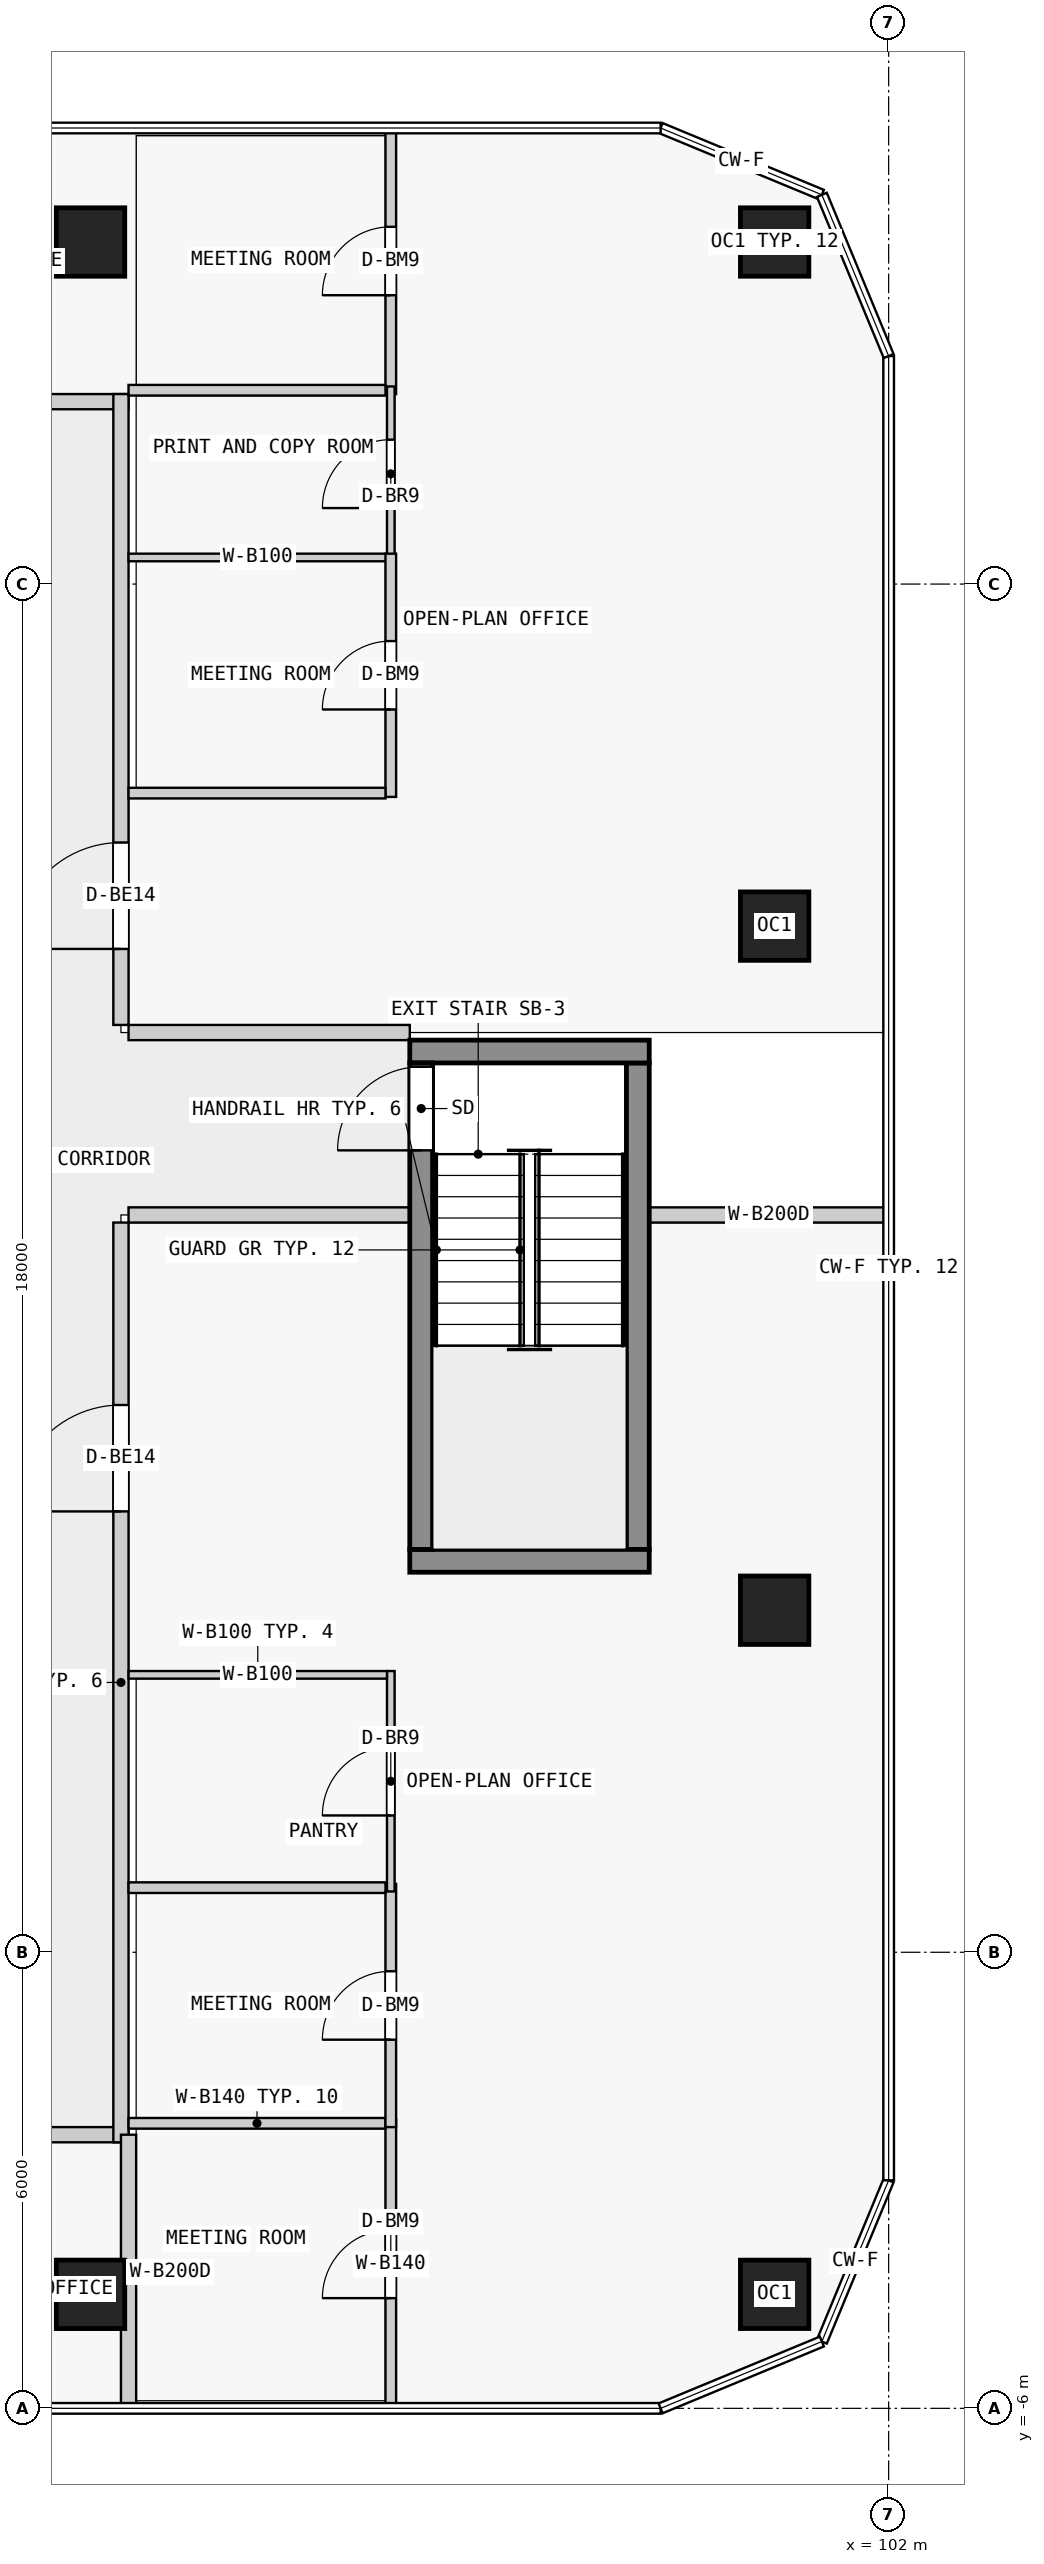
"""IFC4 building model, lengths in metres.
Left out: names, types, materials, properties, quantities, classifications, styles, units other than length and angle.
Written with IfcOpenShell. Run it as: python <this file> out.ifc"""

import sys

from ifc_helpers import new_model, si_unit, direction, frame, frame_2d, origin, origin_2d, place, context, subcontext, project, spatial, rectangle, extrude, element, fill, save


model = new_model("IFC4")
c1 = context("Model", 3, precision=1e-05, world=origin(), true_north=direction((0.0, 1.0)))
c2 = subcontext(c1, "Body", "Model", "MODEL_VIEW")
j1 = project(units=[si_unit("LENGTHUNIT", "METRE"), si_unit("PLANEANGLEUNIT", "RADIAN")], contexts=[c1])
p1 = place(None, origin())
s1 = spatial("IfcSite", under=j1, at=p1, CompositionType="ELEMENT")
p2 = place(p1, origin())
s2 = spatial("IfcBuilding", under=s1, at=p2, CompositionType="ELEMENT")
p3 = place(p2, frame((0.0, 0.0, 78.3)))
s3 = spatial("IfcBuildingStorey", under=s2, at=p3, CompositionType="ELEMENT", Elevation=78.3)
for number, where, z_axis, x_axis in (
    (1, (91.5, -4.5, 0.0), (0.0, 0.0, 1.0), (1.0, 0.0, 0.0)),
    (2, (100.5, -4.5, 0.0), (0.0, 0.0, 1.0), (1.0, 0.0, 0.0)),
    (3, (100.5, 4.5, 0.0), (0.0, 0.0, 1.0), (1.0, 0.0, 0.0)),
    (4, (100.5, 13.5, 0.0), (0.0, 0.0, 1.0), (1.0, 0.0, 0.0)),
    (5, (100.5, 22.5, 0.0), (0.0, 0.0, 1.0), (1.0, 0.0, 0.0)),
    (6, (91.5, 22.5, 0.0), (0.0, 0.0, 1.0), (1.0, 0.0, 0.0)),
):
    element("IfcColumn", number, at=place(p3, frame(where, z_axis=z_axis, x_axis=x_axis)), inside=s3, PredefinedType="COLUMN", context=c2, shape_type="SweptSolid", body=[
        extrude(rectangle(XDim=0.9, YDim=0.9, at=origin_2d()), origin(), (0.0, 0.0, 1.0), 3.5),
    ])
p4 = place(p3, frame((95.85, 5.3, 0.0), z_axis=(0.0, 0.0, 1.0), x_axis=(0.0, 1.0, 0.0)))
e7 = element("IfcWall", 7, at=p4, inside=s3, PredefinedType="SHEAR", context=c2, shape_type="SweptSolid", body=[
    extrude(rectangle(XDim=6.4, YDim=0.3, at=frame_2d((3.2, 0.0))), origin(), (0.0, 0.0, 1.0), 3.25),
])
p5 = place(p4, frame((5.25, 0.0, 0.0)))
e8 = element("IfcOpeningElement", 8, at=p5, cuts=e7, PredefinedType="OPENING", context=c2, shape_type="SweptSolid", body=[
    extrude(rectangle(XDim=1.1, YDim=2.1, at=frame_2d((0.55, 1.05))), frame((0.0, 0.16, 0.0), z_axis=(0.0, -1.0, 0.0), x_axis=(1.0, 0.0, 0.0)), (0.0, 0.0, 1.0), 0.32),
])
p6 = place(p3, frame((98.7, 5.3, 0.0), z_axis=(0.0, 0.0, 1.0), x_axis=(0.0, 1.0, 0.0)))
e9 = element("IfcWall", 9, at=p6, inside=s3, PredefinedType="SHEAR", context=c2, shape_type="SweptSolid", body=[
    extrude(rectangle(XDim=6.4, YDim=0.3, at=frame_2d((3.2, 0.0))), origin(), (0.0, 0.0, 1.0), 3.25),
])
for number, where, z_axis, x_axis in (
    (10, (95.7, 5.15, 0.0), (0.0, 0.0, 1.0), (1.0, 0.0, 0.0)),
    (11, (95.7, 11.85, 0.0), (0.0, 0.0, 1.0), (1.0, 0.0, 0.0)),
):
    element("IfcWall", number, at=place(p3, frame(where, z_axis=z_axis, x_axis=x_axis)), inside=s3, PredefinedType="SHEAR", context=c2, shape_type="SweptSolid", body=[
        extrude(rectangle(XDim=3.15, YDim=0.3, at=frame_2d((1.575, 0.0))), origin(), (0.0, 0.0, 1.0), 3.25),
    ])
p7 = place(p3, frame((72.0, -2.4, 0.0), z_axis=(0.0, 0.0, 1.0), x_axis=(1.0, 0.0, 0.0)))
e12 = element("IfcWall", 12, at=p7, inside=s3, PredefinedType="PARTITIONING", context=c2, shape_type="SweptSolid", body=[
    extrude(rectangle(XDim=20.0, YDim=0.2, at=frame_2d((10.0, 0.0))), origin(), (0.0, 0.0, 1.0), 3.25),
])
p8 = place(p7, frame((11.5, 0.0, 0.0)))
e13 = element("IfcOpeningElement", 13, at=p8, cuts=e12, PredefinedType="OPENING", context=c2, shape_type="SweptSolid", body=[
    extrude(rectangle(XDim=1.0, YDim=2.4, at=frame_2d((0.5, 1.2))), frame((0.0, 0.11, 0.0), z_axis=(0.0, -1.0, 0.0), x_axis=(1.0, 0.0, 0.0)), (0.0, 0.0, 1.0), 0.22),
])
p9 = place(p3, frame((72.0, 20.4, 0.0), z_axis=(0.0, 0.0, 1.0), x_axis=(1.0, 0.0, 0.0)))
e14 = element("IfcWall", 14, at=p9, inside=s3, PredefinedType="PARTITIONING", context=c2, shape_type="SweptSolid", body=[
    extrude(rectangle(XDim=20.0, YDim=0.2, at=frame_2d((10.0, 0.0))), origin(), (0.0, 0.0, 1.0), 3.25),
])
p10 = place(p3, frame((91.9, -2.5, 0.0), z_axis=(0.0, 0.0, 1.0), x_axis=(0.0, 1.0, 0.0)))
e15 = element("IfcWall", 15, at=p10, inside=s3, PredefinedType="PARTITIONING", context=c2, shape_type="SweptSolid", body=[
    extrude(rectangle(XDim=12.1, YDim=0.2, at=frame_2d((6.05, 0.0))), origin(), (0.0, 0.0, 1.0), 3.25),
])
p11 = place(p10, frame((8.3, 0.0, 0.0)))
e16 = element("IfcOpeningElement", 16, at=p11, cuts=e15, PredefinedType="OPENING", context=c2, shape_type="SweptSolid", body=[
    extrude(rectangle(XDim=1.4, YDim=2.4, at=frame_2d((0.7, 1.2))), frame((0.0, 0.11, 0.0), z_axis=(0.0, -1.0, 0.0), x_axis=(1.0, 0.0, 0.0)), (0.0, 0.0, 1.0), 0.22),
])
p12 = place(p3, frame((91.9, 12.2, 0.0), z_axis=(0.0, 0.0, 1.0), x_axis=(0.0, 1.0, 0.0)))
e17 = element("IfcWall", 17, at=p12, inside=s3, PredefinedType="PARTITIONING", context=c2, shape_type="SweptSolid", body=[
    extrude(rectangle(XDim=8.3, YDim=0.2, at=frame_2d((4.15, 0.0))), origin(), (0.0, 0.0, 1.0), 3.25),
])
p13 = place(p12, frame((1.0, 0.0, 0.0)))
e18 = element("IfcOpeningElement", 18, at=p13, cuts=e17, PredefinedType="OPENING", context=c2, shape_type="SweptSolid", body=[
    extrude(rectangle(XDim=1.4, YDim=2.4, at=frame_2d((0.7, 1.2))), frame((0.0, 0.11, 0.0), z_axis=(0.0, -1.0, 0.0), x_axis=(1.0, 0.0, 0.0)), (0.0, 0.0, 1.0), 0.22),
])
for number, where, z_axis, x_axis in (
    (19, (92.0, 9.7, 0.0), (0.0, 0.0, 1.0), (1.0, 0.0, 0.0)),
    (20, (92.0, 12.1, 0.0), (0.0, 0.0, 1.0), (1.0, 0.0, 0.0)),
):
    element("IfcWall", number, at=place(p3, frame(where, z_axis=z_axis, x_axis=x_axis)), inside=s3, PredefinedType="PARTITIONING", context=c2, shape_type="SweptSolid", body=[
        extrude(rectangle(XDim=3.7, YDim=0.2, at=frame_2d((1.85, 0.0))), origin(), (0.0, 0.0, 1.0), 3.25),
    ])
p14 = place(p3, frame((98.85, 9.7, 0.0), z_axis=(0.0, 0.0, 1.0), x_axis=(1.0, 0.0, 0.0)))
e21 = element("IfcWall", 21, at=p14, inside=s3, PredefinedType="PARTITIONING", context=c2, shape_type="SweptSolid", body=[
    extrude(rectangle(XDim=3.15, YDim=0.2, at=frame_2d((1.575, 0.0))), origin(), (0.0, 0.0, 1.0), 3.25),
])
p15 = place(p3, frame((92.0, -6.0, 0.0), z_axis=(0.0, 0.0, 1.0), x_axis=(0.0, 1.0, 0.0)))
e22 = element("IfcWall", 22, at=p15, inside=s3, PredefinedType="PARTITIONING", context=c2, shape_type="SweptSolid", body=[
    extrude(rectangle(XDim=3.6, YDim=0.2, at=frame_2d((1.8, 0.0))), origin(), (0.0, 0.0, 1.0), 3.25),
])
p16 = place(p3, frame((95.45, -6.0, 0.0), z_axis=(0.0, 0.0, 1.0), x_axis=(0.0, 1.0, 0.0)))
e23 = element("IfcWall", 23, at=p16, inside=s3, PredefinedType="PARTITIONING", context=c2, shape_type="SweptSolid", body=[
    extrude(rectangle(XDim=3.8, YDim=0.14, at=frame_2d((1.9, 0.0))), origin(), (0.0, 0.0, 1.0), 3.25),
])
p17 = place(p16, frame((1.45, 0.0, 0.0)))
e24 = element("IfcOpeningElement", 24, at=p17, cuts=e23, PredefinedType="OPENING", context=c2, shape_type="SweptSolid", body=[
    extrude(rectangle(XDim=0.9, YDim=2.4, at=frame_2d((0.45, 1.2))), frame((0.0, 0.08, 0.0), z_axis=(0.0, -1.0, 0.0), x_axis=(1.0, 0.0, 0.0)), (0.0, 0.0, 1.0), 0.16),
])
p18 = place(p3, frame((92.0, -2.25, 0.0), z_axis=(0.0, 0.0, 1.0), x_axis=(1.0, 0.0, 0.0)))
e25 = element("IfcWall", 25, at=p18, inside=s3, PredefinedType="PARTITIONING", context=c2, shape_type="SweptSolid", body=[
    extrude(rectangle(XDim=3.38, YDim=0.14, at=frame_2d((1.69, 0.0))), origin(), (0.0, 0.0, 1.0), 3.25),
])
p19 = place(p3, frame((95.45, -2.3, 0.0), z_axis=(0.0, 0.0, 1.0), x_axis=(0.0, 1.0, 0.0)))
e26 = element("IfcWall", 26, at=p19, inside=s3, PredefinedType="PARTITIONING", context=c2, shape_type="SweptSolid", body=[
    extrude(rectangle(XDim=3.2, YDim=0.14, at=frame_2d((1.6, 0.0))), origin(), (0.0, 0.0, 1.0), 3.25),
])
p20 = place(p19, frame((1.15, 0.0, 0.0)))
e27 = element("IfcOpeningElement", 27, at=p20, cuts=e26, PredefinedType="OPENING", context=c2, shape_type="SweptSolid", body=[
    extrude(rectangle(XDim=0.9, YDim=2.4, at=frame_2d((0.45, 1.2))), frame((0.0, 0.08, 0.0), z_axis=(0.0, -1.0, 0.0), x_axis=(1.0, 0.0, 0.0)), (0.0, 0.0, 1.0), 0.16),
])
p21 = place(p3, frame((92.0, 0.85, 0.0), z_axis=(0.0, 0.0, 1.0), x_axis=(1.0, 0.0, 0.0)))
e28 = element("IfcWall", 28, at=p21, inside=s3, PredefinedType="PARTITIONING", context=c2, shape_type="SweptSolid", body=[
    extrude(rectangle(XDim=3.38, YDim=0.14, at=frame_2d((1.69, 0.0))), origin(), (0.0, 0.0, 1.0), 3.25),
])
p22 = place(p3, frame((95.45, 0.8, 0.0), z_axis=(0.0, 0.0, 1.0), x_axis=(0.0, 1.0, 0.0)))
e29 = element("IfcWall", 29, at=p22, inside=s3, PredefinedType="PARTITIONING", context=c2, shape_type="SweptSolid", body=[
    extrude(rectangle(XDim=2.9, YDim=0.1, at=frame_2d((1.45, 0.0))), origin(), (0.0, 0.0, 1.0), 3.25),
])
p23 = place(p22, frame((1.0, 0.0, 0.0)))
e30 = element("IfcOpeningElement", 30, at=p23, cuts=e29, PredefinedType="OPENING", context=c2, shape_type="SweptSolid", body=[
    extrude(rectangle(XDim=0.9, YDim=2.1, at=frame_2d((0.45, 1.05))), frame((0.0, 0.06, 0.0), z_axis=(0.0, -1.0, 0.0), x_axis=(1.0, 0.0, 0.0)), (0.0, 0.0, 1.0), 0.12),
])
p24 = place(p3, frame((92.0, 3.65, 0.0), z_axis=(0.0, 0.0, 1.0), x_axis=(1.0, 0.0, 0.0)))
e31 = element("IfcWall", 31, at=p24, inside=s3, PredefinedType="PARTITIONING", context=c2, shape_type="SweptSolid", body=[
    extrude(rectangle(XDim=3.4, YDim=0.1, at=frame_2d((1.7, 0.0))), origin(), (0.0, 0.0, 1.0), 3.25),
])
p25 = place(p3, frame((95.45, 20.5, 0.0), z_axis=(0.0, 0.0, 1.0), x_axis=(0.0, 1.0, 0.0)))
e32 = element("IfcWall", 32, at=p25, inside=s3, PredefinedType="PARTITIONING", context=c2, shape_type="SweptSolid", body=[
    extrude(rectangle(XDim=3.5, YDim=0.14, at=frame_2d((1.75, 0.0))), origin(), (0.0, 0.0, 1.0), 3.25),
])
p26 = place(p25, frame((1.3, 0.0, 0.0)))
e33 = element("IfcOpeningElement", 33, at=p26, cuts=e32, PredefinedType="OPENING", context=c2, shape_type="SweptSolid", body=[
    extrude(rectangle(XDim=0.9, YDim=2.4, at=frame_2d((0.45, 1.2))), frame((0.0, 0.08, 0.0), z_axis=(0.0, -1.0, 0.0), x_axis=(1.0, 0.0, 0.0)), (0.0, 0.0, 1.0), 0.16),
])
p27 = place(p3, frame((92.0, 20.55, 0.0), z_axis=(0.0, 0.0, 1.0), x_axis=(1.0, 0.0, 0.0)))
e34 = element("IfcWall", 34, at=p27, inside=s3, PredefinedType="PARTITIONING", context=c2, shape_type="SweptSolid", body=[
    extrude(rectangle(XDim=3.38, YDim=0.14, at=frame_2d((1.69, 0.0))), origin(), (0.0, 0.0, 1.0), 3.25),
])
p28 = place(p3, frame((95.45, 18.3, 0.0), z_axis=(0.0, 0.0, 1.0), x_axis=(0.0, 1.0, 0.0)))
e35 = element("IfcWall", 35, at=p28, inside=s3, PredefinedType="PARTITIONING", context=c2, shape_type="SweptSolid", body=[
    extrude(rectangle(XDim=2.3, YDim=0.1, at=frame_2d((1.15, 0.0))), origin(), (0.0, 0.0, 1.0), 3.25),
])
p29 = place(p28, frame((0.7, 0.0, 0.0)))
e36 = element("IfcOpeningElement", 36, at=p29, cuts=e35, PredefinedType="OPENING", context=c2, shape_type="SweptSolid", body=[
    extrude(rectangle(XDim=0.9, YDim=2.1, at=frame_2d((0.45, 1.05))), frame((0.0, 0.06, 0.0), z_axis=(0.0, -1.0, 0.0), x_axis=(1.0, 0.0, 0.0)), (0.0, 0.0, 1.0), 0.12),
])
p30 = place(p3, frame((92.0, 18.35, 0.0), z_axis=(0.0, 0.0, 1.0), x_axis=(1.0, 0.0, 0.0)))
e37 = element("IfcWall", 37, at=p30, inside=s3, PredefinedType="PARTITIONING", context=c2, shape_type="SweptSolid", body=[
    extrude(rectangle(XDim=3.4, YDim=0.1, at=frame_2d((1.7, 0.0))), origin(), (0.0, 0.0, 1.0), 3.25),
])
p31 = place(p3, frame((95.45, 15.2, 0.0), z_axis=(0.0, 0.0, 1.0), x_axis=(0.0, 1.0, 0.0)))
e38 = element("IfcWall", 38, at=p31, inside=s3, PredefinedType="PARTITIONING", context=c2, shape_type="SweptSolid", body=[
    extrude(rectangle(XDim=3.2, YDim=0.14, at=frame_2d((1.6, 0.0))), origin(), (0.0, 0.0, 1.0), 3.25),
])
p32 = place(p31, frame((1.15, 0.0, 0.0)))
e39 = element("IfcOpeningElement", 39, at=p32, cuts=e38, PredefinedType="OPENING", context=c2, shape_type="SweptSolid", body=[
    extrude(rectangle(XDim=0.9, YDim=2.4, at=frame_2d((0.45, 1.2))), frame((0.0, 0.08, 0.0), z_axis=(0.0, -1.0, 0.0), x_axis=(1.0, 0.0, 0.0)), (0.0, 0.0, 1.0), 0.16),
])
p33 = place(p3, frame((92.0, 15.25, 0.0), z_axis=(0.0, 0.0, 1.0), x_axis=(1.0, 0.0, 0.0)))
e40 = element("IfcWall", 40, at=p33, inside=s3, PredefinedType="PARTITIONING", context=c2, shape_type="SweptSolid", body=[
    extrude(rectangle(XDim=3.38, YDim=0.14, at=frame_2d((1.69, 0.0))), origin(), (0.0, 0.0, 1.0), 3.25),
])
p34 = place(p5, origin())
e41 = element("IfcDoor", 41, at=p34, inside=s3, OperationType="SINGLE_SWING_LEFT", PredefinedType="DOOR", context=c2, shape_type="SweptSolid", body=[
    extrude(rectangle(XDim=1.1, YDim=2.1, at=frame_2d((0.55, 1.05))), frame((0.0, 0.025, 0.0), z_axis=(0.0, -1.0, 0.0), x_axis=(1.0, 0.0, 0.0)), (0.0, 0.0, 1.0), 0.05),
])
fill(e8, e41)
p35 = place(p11, origin())
e42 = element("IfcDoor", 42, at=p35, inside=s3, OperationType="DOUBLE_DOOR_SINGLE_SWING", PredefinedType="DOOR", context=c2, shape_type="SweptSolid", body=[
    extrude(rectangle(XDim=1.4, YDim=2.4, at=frame_2d((0.7, 1.2))), frame((0.0, 0.025, 0.0), z_axis=(0.0, -1.0, 0.0), x_axis=(1.0, 0.0, 0.0)), (0.0, 0.0, 1.0), 0.05),
])
fill(e16, e42)
p36 = place(p13, origin())
e43 = element("IfcDoor", 43, at=p36, inside=s3, OperationType="DOUBLE_DOOR_SINGLE_SWING", PredefinedType="DOOR", context=c2, shape_type="SweptSolid", body=[
    extrude(rectangle(XDim=1.4, YDim=2.4, at=frame_2d((0.7, 1.2))), frame((0.0, 0.025, 0.0), z_axis=(0.0, -1.0, 0.0), x_axis=(1.0, 0.0, 0.0)), (0.0, 0.0, 1.0), 0.05),
])
fill(e18, e43)
p37 = place(p17, origin())
e44 = element("IfcDoor", 44, at=p37, inside=s3, OperationType="SINGLE_SWING_LEFT", PredefinedType="DOOR", context=c2, shape_type="SweptSolid", body=[
    extrude(rectangle(XDim=0.9, YDim=2.4, at=frame_2d((0.45, 1.2))), frame((0.0, 0.025, 0.0), z_axis=(0.0, -1.0, 0.0), x_axis=(1.0, 0.0, 0.0)), (0.0, 0.0, 1.0), 0.05),
])
fill(e24, e44)
p38 = place(p20, origin())
e45 = element("IfcDoor", 45, at=p38, inside=s3, OperationType="SINGLE_SWING_LEFT", PredefinedType="DOOR", context=c2, shape_type="SweptSolid", body=[
    extrude(rectangle(XDim=0.9, YDim=2.4, at=frame_2d((0.45, 1.2))), frame((0.0, 0.025, 0.0), z_axis=(0.0, -1.0, 0.0), x_axis=(1.0, 0.0, 0.0)), (0.0, 0.0, 1.0), 0.05),
])
fill(e27, e45)
p39 = place(p23, origin())
e46 = element("IfcDoor", 46, at=p39, inside=s3, OperationType="SINGLE_SWING_LEFT", PredefinedType="DOOR", context=c2, shape_type="SweptSolid", body=[
    extrude(rectangle(XDim=0.9, YDim=2.1, at=frame_2d((0.45, 1.05))), frame((0.0, 0.025, 0.0), z_axis=(0.0, -1.0, 0.0), x_axis=(1.0, 0.0, 0.0)), (0.0, 0.0, 1.0), 0.05),
])
fill(e30, e46)
p40 = place(p26, origin())
e47 = element("IfcDoor", 47, at=p40, inside=s3, OperationType="SINGLE_SWING_LEFT", PredefinedType="DOOR", context=c2, shape_type="SweptSolid", body=[
    extrude(rectangle(XDim=0.9, YDim=2.4, at=frame_2d((0.45, 1.2))), frame((0.0, 0.025, 0.0), z_axis=(0.0, -1.0, 0.0), x_axis=(1.0, 0.0, 0.0)), (0.0, 0.0, 1.0), 0.05),
])
fill(e33, e47)
p41 = place(p29, origin())
e48 = element("IfcDoor", 48, at=p41, inside=s3, OperationType="SINGLE_SWING_LEFT", PredefinedType="DOOR", context=c2, shape_type="SweptSolid", body=[
    extrude(rectangle(XDim=0.9, YDim=2.1, at=frame_2d((0.45, 1.05))), frame((0.0, 0.025, 0.0), z_axis=(0.0, -1.0, 0.0), x_axis=(1.0, 0.0, 0.0)), (0.0, 0.0, 1.0), 0.05),
])
fill(e36, e48)
p42 = place(p32, origin())
e49 = element("IfcDoor", 49, at=p42, inside=s3, OperationType="SINGLE_SWING_LEFT", PredefinedType="DOOR", context=c2, shape_type="SweptSolid", body=[
    extrude(rectangle(XDim=0.9, YDim=2.4, at=frame_2d((0.45, 1.2))), frame((0.0, 0.025, 0.0), z_axis=(0.0, -1.0, 0.0), x_axis=(1.0, 0.0, 0.0)), (0.0, 0.0, 1.0), 0.05),
])
fill(e39, e49)
save(model, sys.argv[1])
